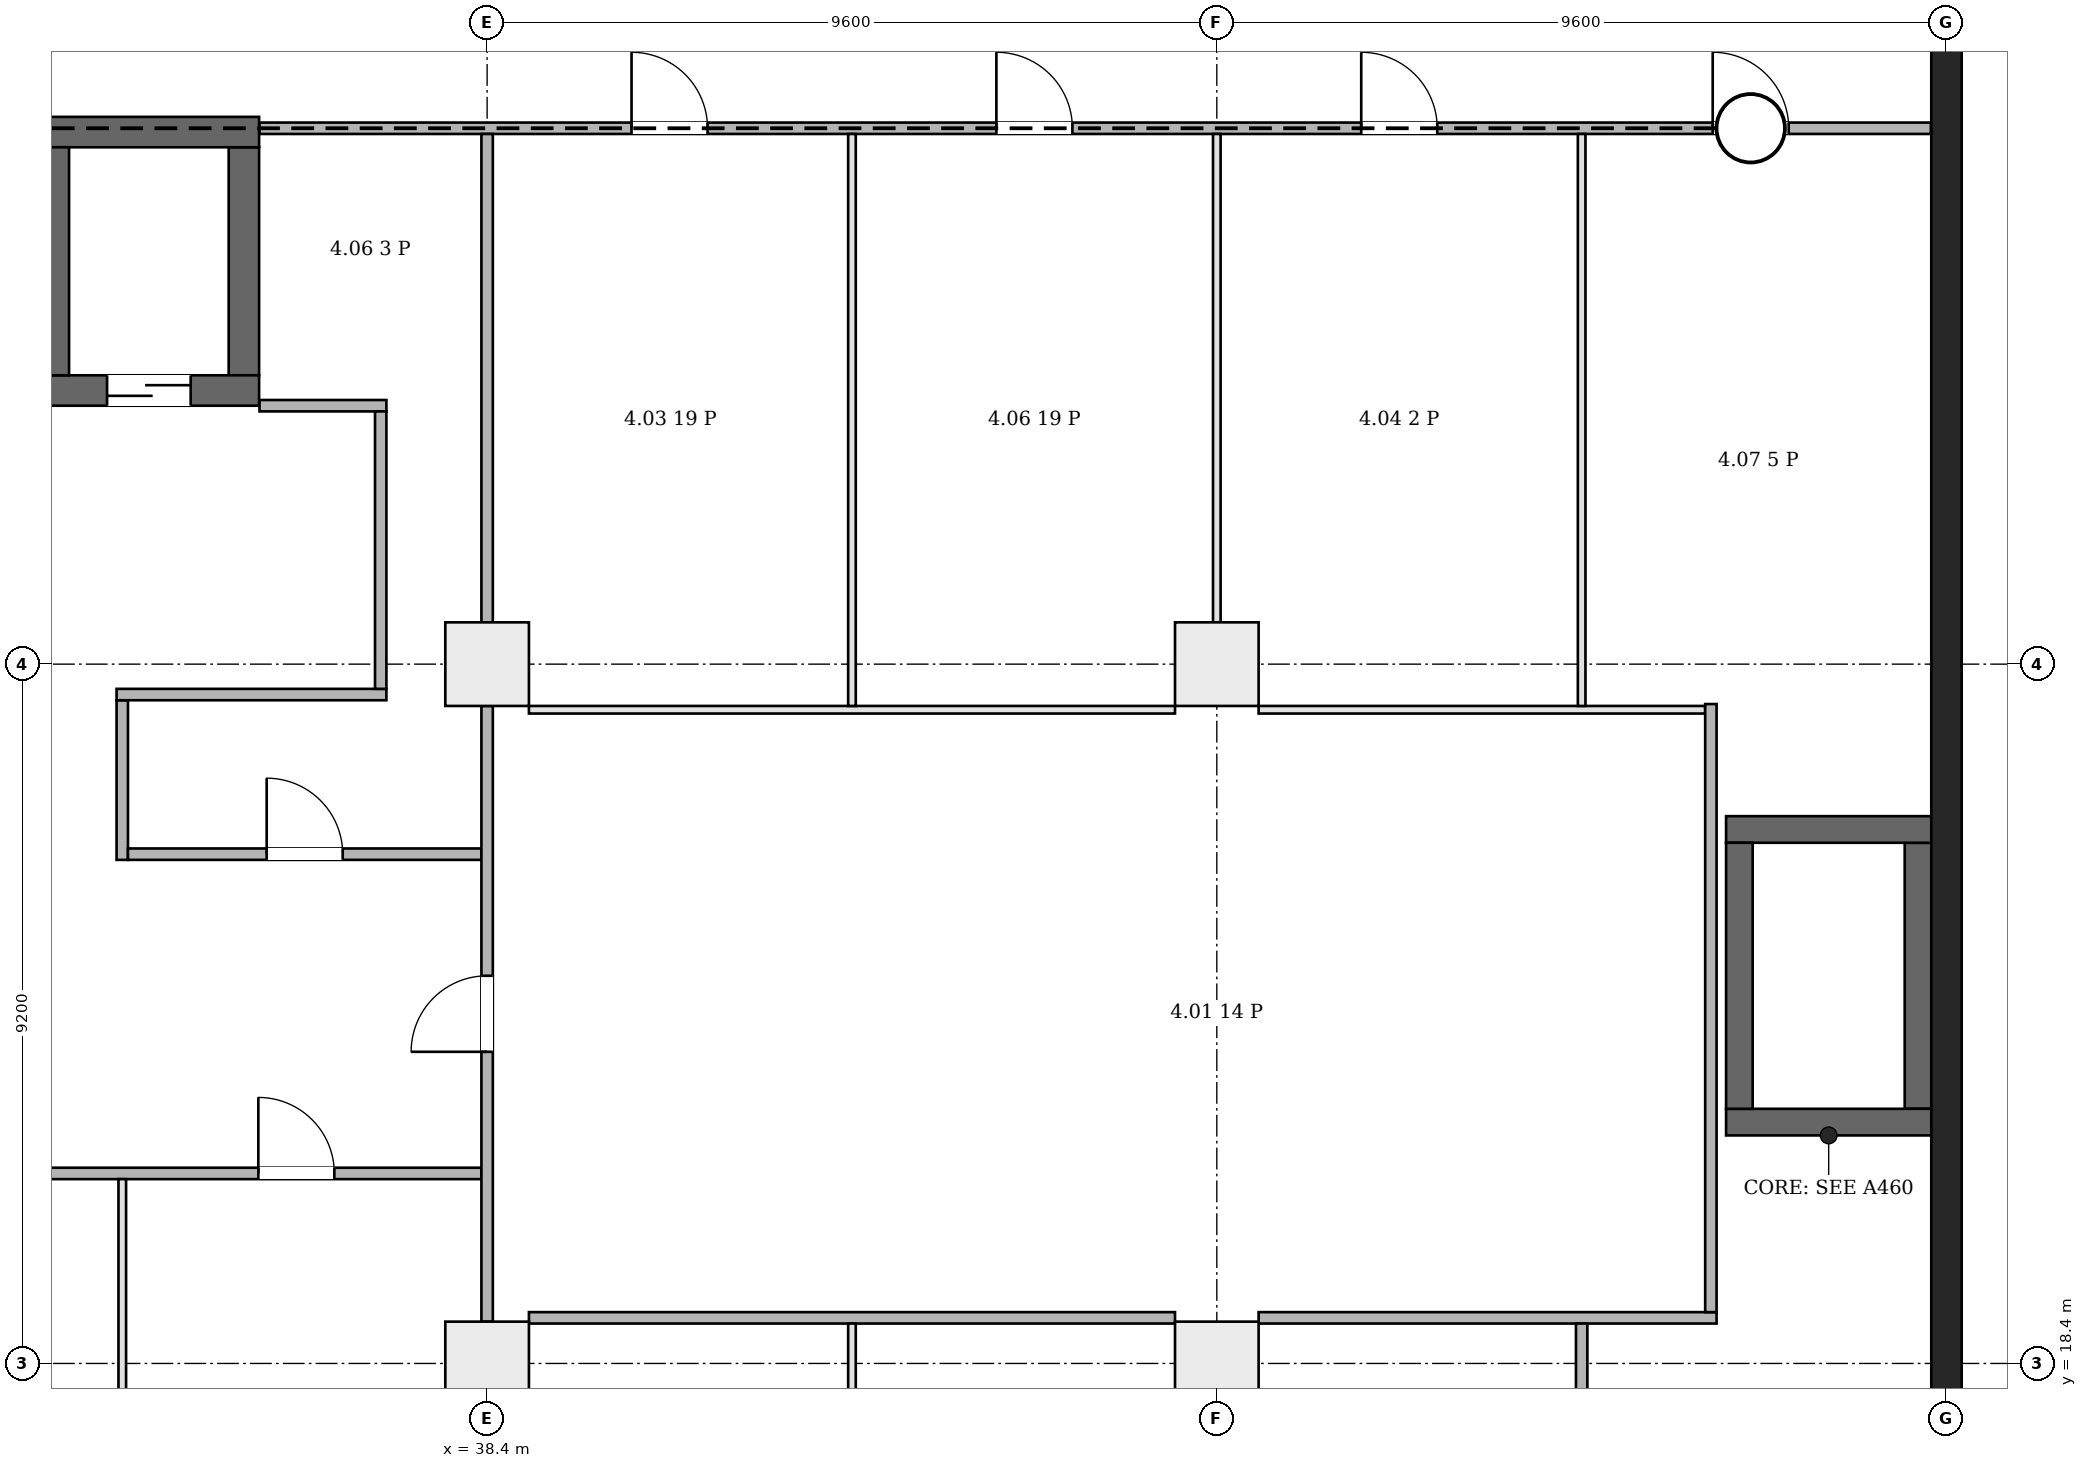
"""IFC4 building model, lengths in metres.
Left out: names, types, materials, properties, quantities, classifications, styles, units other than length and angle.
Written with IfcOpenShell. Run it as: python <this file> out.ifc"""

import sys

from ifc_helpers import new_model, si_unit, direction, frame, frame_2d, origin, origin_2d, place, context, subcontext, project, spatial, rectangle, extrude, element, fill, save


model = new_model("IFC4")
c1 = context("Model", 3, precision=1e-05, world=origin(), true_north=direction((0.0, 1.0)))
c2 = subcontext(c1, "Body", "Model", "MODEL_VIEW")
j1 = project(units=[si_unit("LENGTHUNIT", "METRE"), si_unit("PLANEANGLEUNIT", "RADIAN")], contexts=[c1])
p1 = place(None, origin())
s1 = spatial("IfcSite", under=j1, at=p1, CompositionType="ELEMENT")
p2 = place(p1, origin())
s2 = spatial("IfcBuilding", under=s1, at=p2, CompositionType="ELEMENT")
p3 = place(p2, frame((0.0, 0.0, 26.7)))
s3 = spatial("IfcBuildingStorey", under=s2, at=p3, CompositionType="ELEMENT", Elevation=26.7)
p4 = place(p3, frame((57.6, -0.2, 0.0), z_axis=(0.0, 0.0, 1.0), x_axis=(0.0, 1.0, 0.0)))
e1 = element("IfcWall", 1, at=p4, inside=s3, PredefinedType="SHEAR", context=c2, shape_type="SweptSolid", body=[
    extrude(rectangle(XDim=46.88, YDim=0.4, at=frame_2d((23.44, 0.0))), origin(), (0.0, 0.0, 1.0), 5.2),
])
for number, where, z_axis, x_axis in (
    (2, (54.7, 21.575, 0.0), (0.0, 0.0, 1.0), (1.0, 0.0, 0.0)),
    (3, (54.7, 25.425, 0.0), (0.0, 0.0, 1.0), (1.0, 0.0, 0.0)),
):
    element("IfcWall", number, at=place(p3, frame(where, z_axis=z_axis, x_axis=x_axis)), inside=s3, PredefinedType="SHEAR", context=c2, shape_type="SweptSolid", body=[
        extrude(rectangle(XDim=2.7, YDim=0.35, at=frame_2d((1.35, 0.0))), origin(), (0.0, 0.0, 1.0), 5.2),
    ])
for number, where, z_axis, x_axis in (
    (4, (54.875, 21.75, 0.0), (0.0, 0.0, 1.0), (0.0, 1.0, 0.0)),
    (5, (57.225, 21.75, 0.0), (0.0, 0.0, 1.0), (0.0, 1.0, 0.0)),
):
    element("IfcWall", number, at=place(p3, frame(where, z_axis=z_axis, x_axis=x_axis)), inside=s3, PredefinedType="SHEAR", context=c2, shape_type="SweptSolid", body=[
        extrude(rectangle(XDim=3.5, YDim=0.35, at=frame_2d((1.75, 0.0))), origin(), (0.0, 0.0, 1.0), 5.2),
    ])
p5 = place(p3, frame((32.5, 31.2, 0.0), z_axis=(0.0, 0.0, 1.0), x_axis=(1.0, 0.0, 0.0)))
e6 = element("IfcWall", 6, at=p5, inside=s3, PredefinedType="SHEAR", context=c2, shape_type="SweptSolid", body=[
    extrude(rectangle(XDim=2.9, YDim=0.4, at=frame_2d((1.45, 0.0))), origin(), (0.0, 0.0, 1.0), 5.2),
])
p6 = place(p5, frame((0.9, 0.0, 0.0)))
e7 = element("IfcOpeningElement", 7, at=p6, cuts=e6, PredefinedType="OPENING", context=c2, shape_type="SweptSolid", body=[
    extrude(rectangle(XDim=1.1, YDim=2.1, at=frame_2d((0.55, 1.05))), frame((0.0, 0.21, 0.0), z_axis=(0.0, -1.0, 0.0), x_axis=(1.0, 0.0, 0.0)), (0.0, 0.0, 1.0), 0.42),
])
p7 = place(p3, frame((32.5, 34.6, 0.0), z_axis=(0.0, 0.0, 1.0), x_axis=(1.0, 0.0, 0.0)))
e8 = element("IfcWall", 8, at=p7, inside=s3, PredefinedType="SHEAR", context=c2, shape_type="SweptSolid", body=[
    extrude(rectangle(XDim=2.9, YDim=0.4, at=frame_2d((1.45, 0.0))), origin(), (0.0, 0.0, 1.0), 5.2),
])
for number, where, z_axis, x_axis in (
    (9, (32.7, 31.4, 0.0), (0.0, 0.0, 1.0), (0.0, 1.0, 0.0)),
    (10, (35.2, 31.4, 0.0), (0.0, 0.0, 1.0), (0.0, 1.0, 0.0)),
):
    element("IfcWall", number, at=place(p3, frame(where, z_axis=z_axis, x_axis=x_axis)), inside=s3, PredefinedType="SHEAR", context=c2, shape_type="SweptSolid", body=[
        extrude(rectangle(XDim=3.0, YDim=0.4, at=frame_2d((1.5, 0.0))), origin(), (0.0, 0.0, 1.0), 5.2),
    ])
for number, where, z_axis, x_axis in (
    (11, (38.4, 18.4, 0.0), (0.0, 0.0, 1.0), (1.0, 0.0, 0.0)),
    (12, (48.0, 18.4, 0.0), (0.0, 0.0, 1.0), (1.0, 0.0, 0.0)),
    (13, (38.4, 27.6, 0.0), (0.0, 0.0, 1.0), (1.0, 0.0, 0.0)),
    (14, (48.0, 27.6, 0.0), (0.0, 0.0, 1.0), (1.0, 0.0, 0.0)),
):
    element("IfcColumn", number, at=place(p3, frame(where, z_axis=z_axis, x_axis=x_axis)), inside=s3, PredefinedType="COLUMN", context=c2, shape_type="SweptSolid", body=[
        extrude(rectangle(XDim=1.1, YDim=1.1, at=origin_2d()), origin(), (0.0, 0.0, 1.0), 5.2),
    ])
p8 = place(p3, frame((29.075, 20.9, 0.0), z_axis=(0.0, 0.0, 1.0), x_axis=(1.0, 0.0, 0.0)))
e15 = element("IfcWall", 15, at=p8, inside=s3, PredefinedType="PARTITIONING", context=c2, shape_type="SweptSolid", body=[
    extrude(rectangle(XDim=9.25, YDim=0.15, at=frame_2d((4.625, 0.0))), origin(), (0.0, 0.0, 1.0), 4.85),
])
p9 = place(p8, frame((1.835, 0.0, 0.0)))
e16 = element("IfcOpeningElement", 16, at=p9, cuts=e15, PredefinedType="OPENING", context=c2, shape_type="SweptSolid", body=[
    extrude(rectangle(XDim=1.0, YDim=2.1, at=frame_2d((0.5, 1.05))), frame((0.0, 0.085, 0.0), z_axis=(0.0, -1.0, 0.0), x_axis=(1.0, 0.0, 0.0)), (0.0, 0.0, 1.0), 0.17),
])
p10 = place(p8, frame((6.315, 0.0, 0.0)))
e17 = element("IfcOpeningElement", 17, at=p10, cuts=e15, PredefinedType="OPENING", context=c2, shape_type="SweptSolid", body=[
    extrude(rectangle(XDim=1.0, YDim=2.1, at=frame_2d((0.5, 1.05))), frame((0.0, 0.085, 0.0), z_axis=(0.0, -1.0, 0.0), x_axis=(1.0, 0.0, 0.0)), (0.0, 0.0, 1.0), 0.17),
])
p11 = place(p3, frame((33.6, 25.025, 0.0), z_axis=(0.0, 0.0, 1.0), x_axis=(0.0, 1.0, 0.0)))
e18 = element("IfcWall", 18, at=p11, inside=s3, PredefinedType="PARTITIONING", context=c2, shape_type="SweptSolid", body=[
    extrude(rectangle(XDim=2.1, YDim=0.15, at=frame_2d((1.05, 0.0))), origin(), (0.0, 0.0, 1.0), 4.85),
])
p12 = place(p3, frame((33.525, 27.2, 0.0), z_axis=(0.0, 0.0, 1.0), x_axis=(1.0, 0.0, 0.0)))
e19 = element("IfcWall", 19, at=p12, inside=s3, PredefinedType="PARTITIONING", context=c2, shape_type="SweptSolid", body=[
    extrude(rectangle(XDim=3.55, YDim=0.15, at=frame_2d((1.775, 0.0))), origin(), (0.0, 0.0, 1.0), 4.85),
])
p13 = place(p3, frame((33.6, 11.575, 0.0), z_axis=(0.0, 0.0, 1.0), x_axis=(0.0, 1.0, 0.0)))
e20 = element("IfcWall", 20, at=p13, inside=s3, PredefinedType="PARTITIONING", context=c2, shape_type="SweptSolid", body=[
    extrude(rectangle(XDim=9.25, YDim=0.1, at=frame_2d((4.625, 0.0))), origin(), (0.0, 0.0, 1.0), 4.85),
])
p14 = place(p3, frame((33.675, 25.1, 0.0), z_axis=(0.0, 0.0, 1.0), x_axis=(1.0, 0.0, 0.0)))
e21 = element("IfcWall", 21, at=p14, inside=s3, PredefinedType="PARTITIONING", context=c2, shape_type="SweptSolid", body=[
    extrude(rectangle(XDim=4.65, YDim=0.15, at=frame_2d((2.325, 0.0))), origin(), (0.0, 0.0, 1.0), 4.85),
])
p15 = place(p14, frame((1.825, 0.0, 0.0)))
e22 = element("IfcOpeningElement", 22, at=p15, cuts=e21, PredefinedType="OPENING", context=c2, shape_type="SweptSolid", body=[
    extrude(rectangle(XDim=1.0, YDim=2.1, at=frame_2d((0.5, 1.05))), frame((0.0, 0.085, 0.0), z_axis=(0.0, -1.0, 0.0), x_axis=(1.0, 0.0, 0.0)), (0.0, 0.0, 1.0), 0.17),
])
p16 = place(p3, frame((35.406, 31.0, 0.0), z_axis=(0.0, 0.0, 1.0), x_axis=(1.0, 0.0, 0.0)))
e23 = element("IfcWall", 23, at=p16, inside=s3, PredefinedType="PARTITIONING", context=c2, shape_type="SweptSolid", body=[
    extrude(rectangle(XDim=1.669, YDim=0.15, at=frame_2d((0.834, 0.0))), origin(), (0.0, 0.0, 1.0), 4.85),
])
p17 = place(p3, frame((35.406, 34.65, 0.0), z_axis=(0.0, 0.0, 1.0), x_axis=(1.0, 0.0, 0.0)))
e24 = element("IfcWall", 24, at=p17, inside=s3, PredefinedType="PARTITIONING", context=c2, shape_type="SweptSolid", body=[
    extrude(rectangle(XDim=21.988, YDim=0.15, at=frame_2d((10.994, 0.0))), origin(), (0.0, 0.0, 1.0), 4.85),
])
p18 = place(p17, frame((4.894, 0.0, 0.0)))
e25 = element("IfcOpeningElement", 25, at=p18, cuts=e24, PredefinedType="OPENING", context=c2, shape_type="SweptSolid", body=[
    extrude(rectangle(XDim=1.0, YDim=2.1, at=frame_2d((0.5, 1.05))), frame((0.0, 0.085, 0.0), z_axis=(0.0, -1.0, 0.0), x_axis=(1.0, 0.0, 0.0)), (0.0, 0.0, 1.0), 0.17),
])
p19 = place(p17, frame((9.694, 0.0, 0.0)))
e26 = element("IfcOpeningElement", 26, at=p19, cuts=e24, PredefinedType="OPENING", context=c2, shape_type="SweptSolid", body=[
    extrude(rectangle(XDim=1.0, YDim=2.1, at=frame_2d((0.5, 1.05))), frame((0.0, 0.085, 0.0), z_axis=(0.0, -1.0, 0.0), x_axis=(1.0, 0.0, 0.0)), (0.0, 0.0, 1.0), 0.17),
])
p20 = place(p17, frame((14.494, 0.0, 0.0)))
e27 = element("IfcOpeningElement", 27, at=p20, cuts=e24, PredefinedType="OPENING", context=c2, shape_type="SweptSolid", body=[
    extrude(rectangle(XDim=1.0, YDim=2.1, at=frame_2d((0.5, 1.05))), frame((0.0, 0.085, 0.0), z_axis=(0.0, -1.0, 0.0), x_axis=(1.0, 0.0, 0.0)), (0.0, 0.0, 1.0), 0.17),
])
p21 = place(p17, frame((19.118, 0.0, 0.0)))
e28 = element("IfcOpeningElement", 28, at=p21, cuts=e24, PredefinedType="OPENING", context=c2, shape_type="SweptSolid", body=[
    extrude(rectangle(XDim=1.0, YDim=2.1, at=frame_2d((0.5, 1.05))), frame((0.0, 0.085, 0.0), z_axis=(0.0, -1.0, 0.0), x_axis=(1.0, 0.0, 0.0)), (0.0, 0.0, 1.0), 0.17),
])
p22 = place(p3, frame((37.0, 27.275, 0.0), z_axis=(0.0, 0.0, 1.0), x_axis=(0.0, 1.0, 0.0)))
e29 = element("IfcWall", 29, at=p22, inside=s3, PredefinedType="PARTITIONING", context=c2, shape_type="SweptSolid", body=[
    extrude(rectangle(XDim=3.65, YDim=0.15, at=frame_2d((1.825, 0.0))), origin(), (0.0, 0.0, 1.0), 4.85),
])
p23 = place(p3, frame((38.4, 18.95, 0.0), z_axis=(0.0, 0.0, 1.0), x_axis=(0.0, 1.0, 0.0)))
e30 = element("IfcWall", 30, at=p23, inside=s3, PredefinedType="PARTITIONING", context=c2, shape_type="SweptSolid", body=[
    extrude(rectangle(XDim=8.1, YDim=0.15, at=frame_2d((4.05, 0.0))), origin(), (0.0, 0.0, 1.0), 4.45),
])
p24 = place(p23, frame((3.55, 0.0, 0.0)))
e31 = element("IfcOpeningElement", 31, at=p24, cuts=e30, PredefinedType="OPENING", context=c2, shape_type="SweptSolid", body=[
    extrude(rectangle(XDim=1.0, YDim=2.1, at=frame_2d((0.5, 1.05))), frame((0.0, 0.085, 0.0), z_axis=(0.0, -1.0, 0.0), x_axis=(1.0, 0.0, 0.0)), (0.0, 0.0, 1.0), 0.17),
])
p25 = place(p3, frame((38.4, 28.15, 0.0), z_axis=(0.0, 0.0, 1.0), x_axis=(0.0, 1.0, 0.0)))
e32 = element("IfcWall", 32, at=p25, inside=s3, PredefinedType="PARTITIONING", context=c2, shape_type="SweptSolid", body=[
    extrude(rectangle(XDim=6.425, YDim=0.15, at=frame_2d((3.212, 0.0))), origin(), (0.0, 0.0, 1.0), 4.45),
])
p26 = place(p3, frame((38.95, 19.0, 0.0), z_axis=(0.0, 0.0, 1.0), x_axis=(1.0, 0.0, 0.0)))
e33 = element("IfcWall", 33, at=p26, inside=s3, PredefinedType="PARTITIONING", context=c2, shape_type="SweptSolid", body=[
    extrude(rectangle(XDim=8.5, YDim=0.15, at=frame_2d((4.25, 0.0))), origin(), (0.0, 0.0, 1.0), 4.85),
])
p27 = place(p3, frame((38.95, 27.0, 0.0), z_axis=(0.0, 0.0, 1.0), x_axis=(1.0, 0.0, 0.0)))
e34 = element("IfcWall", 34, at=p27, inside=s3, PredefinedType="PARTITIONING", context=c2, shape_type="SweptSolid", body=[
    extrude(rectangle(XDim=8.5, YDim=0.1, at=frame_2d((4.25, 0.0))), origin(), (0.0, 0.0, 1.0), 4.85),
])
p28 = place(p3, frame((43.2, 11.575, 0.0), z_axis=(0.0, 0.0, 1.0), x_axis=(0.0, 1.0, 0.0)))
e35 = element("IfcWall", 35, at=p28, inside=s3, PredefinedType="PARTITIONING", context=c2, shape_type="SweptSolid", body=[
    extrude(rectangle(XDim=7.35, YDim=0.1, at=frame_2d((3.675, 0.0))), origin(), (0.0, 0.0, 1.0), 4.85),
])
p29 = place(p3, frame((43.2, 27.05, 0.0), z_axis=(0.0, 0.0, 1.0), x_axis=(0.0, 1.0, 0.0)))
e36 = element("IfcWall", 36, at=p29, inside=s3, PredefinedType="PARTITIONING", context=c2, shape_type="SweptSolid", body=[
    extrude(rectangle(XDim=7.525, YDim=0.1, at=frame_2d((3.762, 0.0))), origin(), (0.0, 0.0, 1.0), 4.85),
])
p30 = place(p3, frame((48.0, 28.15, 0.0), z_axis=(0.0, 0.0, 1.0), x_axis=(0.0, 1.0, 0.0)))
e37 = element("IfcWall", 37, at=p30, inside=s3, PredefinedType="PARTITIONING", context=c2, shape_type="SweptSolid", body=[
    extrude(rectangle(XDim=6.425, YDim=0.1, at=frame_2d((3.212, 0.0))), origin(), (0.0, 0.0, 1.0), 4.85),
])
p31 = place(p3, frame((48.55, 19.0, 0.0), z_axis=(0.0, 0.0, 1.0), x_axis=(1.0, 0.0, 0.0)))
e38 = element("IfcWall", 38, at=p31, inside=s3, PredefinedType="PARTITIONING", context=c2, shape_type="SweptSolid", body=[
    extrude(rectangle(XDim=6.025, YDim=0.15, at=frame_2d((3.012, 0.0))), origin(), (0.0, 0.0, 1.0), 4.85),
])
p32 = place(p3, frame((48.55, 27.0, 0.0), z_axis=(0.0, 0.0, 1.0), x_axis=(1.0, 0.0, 0.0)))
e39 = element("IfcWall", 39, at=p32, inside=s3, PredefinedType="PARTITIONING", context=c2, shape_type="SweptSolid", body=[
    extrude(rectangle(XDim=5.875, YDim=0.1, at=frame_2d((2.938, 0.0))), origin(), (0.0, 0.0, 1.0), 4.85),
])
p33 = place(p3, frame((52.8, 11.575, 0.0), z_axis=(0.0, 0.0, 1.0), x_axis=(0.0, 1.0, 0.0)))
e40 = element("IfcWall", 40, at=p33, inside=s3, PredefinedType="PARTITIONING", context=c2, shape_type="SweptSolid", body=[
    extrude(rectangle(XDim=7.35, YDim=0.15, at=frame_2d((3.675, 0.0))), origin(), (0.0, 0.0, 1.0), 4.85),
])
p34 = place(p3, frame((52.8, 27.05, 0.0), z_axis=(0.0, 0.0, 1.0), x_axis=(0.0, 1.0, 0.0)))
e41 = element("IfcWall", 41, at=p34, inside=s3, PredefinedType="PARTITIONING", context=c2, shape_type="SweptSolid", body=[
    extrude(rectangle(XDim=7.525, YDim=0.1, at=frame_2d((3.762, 0.0))), origin(), (0.0, 0.0, 1.0), 4.85),
])
p35 = place(p3, frame((54.5, 19.075, 0.0), z_axis=(0.0, 0.0, 1.0), x_axis=(0.0, 1.0, 0.0)))
e42 = element("IfcWall", 42, at=p35, inside=s3, PredefinedType="PARTITIONING", context=c2, shape_type="SweptSolid", body=[
    extrude(rectangle(XDim=8.0, YDim=0.15, at=frame_2d((4.0, 0.0))), origin(), (0.0, 0.0, 1.0), 4.85),
])
p36 = place(p6, origin())
e43 = element("IfcDoor", 43, at=p36, inside=s3, OperationType="DOUBLE_DOOR_SLIDING", PredefinedType="DOOR", context=c2, shape_type="SweptSolid", body=[
    extrude(rectangle(XDim=1.1, YDim=2.1, at=frame_2d((0.55, 1.05))), frame((0.0, 0.025, 0.0), z_axis=(0.0, -1.0, 0.0), x_axis=(1.0, 0.0, 0.0)), (0.0, 0.0, 1.0), 0.05),
])
fill(e7, e43)
p37 = place(p10, origin())
e44 = element("IfcDoor", 44, at=p37, inside=s3, OperationType="SINGLE_SWING_LEFT", PredefinedType="DOOR", context=c2, shape_type="SweptSolid", body=[
    extrude(rectangle(XDim=1.0, YDim=2.1, at=frame_2d((0.5, 1.05))), frame((0.0, 0.025, 0.0), z_axis=(0.0, -1.0, 0.0), x_axis=(1.0, 0.0, 0.0)), (0.0, 0.0, 1.0), 0.05),
])
fill(e17, e44)
p38 = place(p15, origin())
e45 = element("IfcDoor", 45, at=p38, inside=s3, OperationType="SINGLE_SWING_LEFT", PredefinedType="DOOR", context=c2, shape_type="SweptSolid", body=[
    extrude(rectangle(XDim=1.0, YDim=2.1, at=frame_2d((0.5, 1.05))), frame((0.0, 0.025, 0.0), z_axis=(0.0, -1.0, 0.0), x_axis=(1.0, 0.0, 0.0)), (0.0, 0.0, 1.0), 0.05),
])
fill(e22, e45)
p39 = place(p18, origin())
e46 = element("IfcDoor", 46, at=p39, inside=s3, OperationType="SINGLE_SWING_RIGHT", PredefinedType="DOOR", context=c2, shape_type="SweptSolid", body=[
    extrude(rectangle(XDim=1.0, YDim=2.1, at=frame_2d((0.5, 1.05))), frame((0.0, 0.025, 0.0), z_axis=(0.0, -1.0, 0.0), x_axis=(1.0, 0.0, 0.0)), (0.0, 0.0, 1.0), 0.05),
])
fill(e25, e46)
p40 = place(p19, origin())
e47 = element("IfcDoor", 47, at=p40, inside=s3, OperationType="SINGLE_SWING_RIGHT", PredefinedType="DOOR", context=c2, shape_type="SweptSolid", body=[
    extrude(rectangle(XDim=1.0, YDim=2.1, at=frame_2d((0.5, 1.05))), frame((0.0, 0.025, 0.0), z_axis=(0.0, -1.0, 0.0), x_axis=(1.0, 0.0, 0.0)), (0.0, 0.0, 1.0), 0.05),
])
fill(e26, e47)
p41 = place(p20, origin())
e48 = element("IfcDoor", 48, at=p41, inside=s3, OperationType="SINGLE_SWING_LEFT", PredefinedType="DOOR", context=c2, shape_type="SweptSolid", body=[
    extrude(rectangle(XDim=1.0, YDim=2.1, at=frame_2d((0.5, 1.05))), frame((0.0, 0.025, 0.0), z_axis=(0.0, -1.0, 0.0), x_axis=(1.0, 0.0, 0.0)), (0.0, 0.0, 1.0), 0.05),
])
fill(e27, e48)
p42 = place(p21, origin())
e49 = element("IfcDoor", 49, at=p42, inside=s3, OperationType="SINGLE_SWING_LEFT", PredefinedType="DOOR", context=c2, shape_type="SweptSolid", body=[
    extrude(rectangle(XDim=1.0, YDim=2.1, at=frame_2d((0.5, 1.05))), frame((0.0, 0.025, 0.0), z_axis=(0.0, -1.0, 0.0), x_axis=(1.0, 0.0, 0.0)), (0.0, 0.0, 1.0), 0.05),
])
fill(e28, e49)
p43 = place(p24, origin())
e50 = element("IfcDoor", 50, at=p43, inside=s3, OperationType="SINGLE_SWING_RIGHT", PredefinedType="DOOR", context=c2, shape_type="SweptSolid", body=[
    extrude(rectangle(XDim=1.0, YDim=2.1, at=frame_2d((0.5, 1.05))), frame((0.0, 0.025, 0.0), z_axis=(0.0, -1.0, 0.0), x_axis=(1.0, 0.0, 0.0)), (0.0, 0.0, 1.0), 0.05),
])
fill(e31, e50)
save(model, sys.argv[1])
